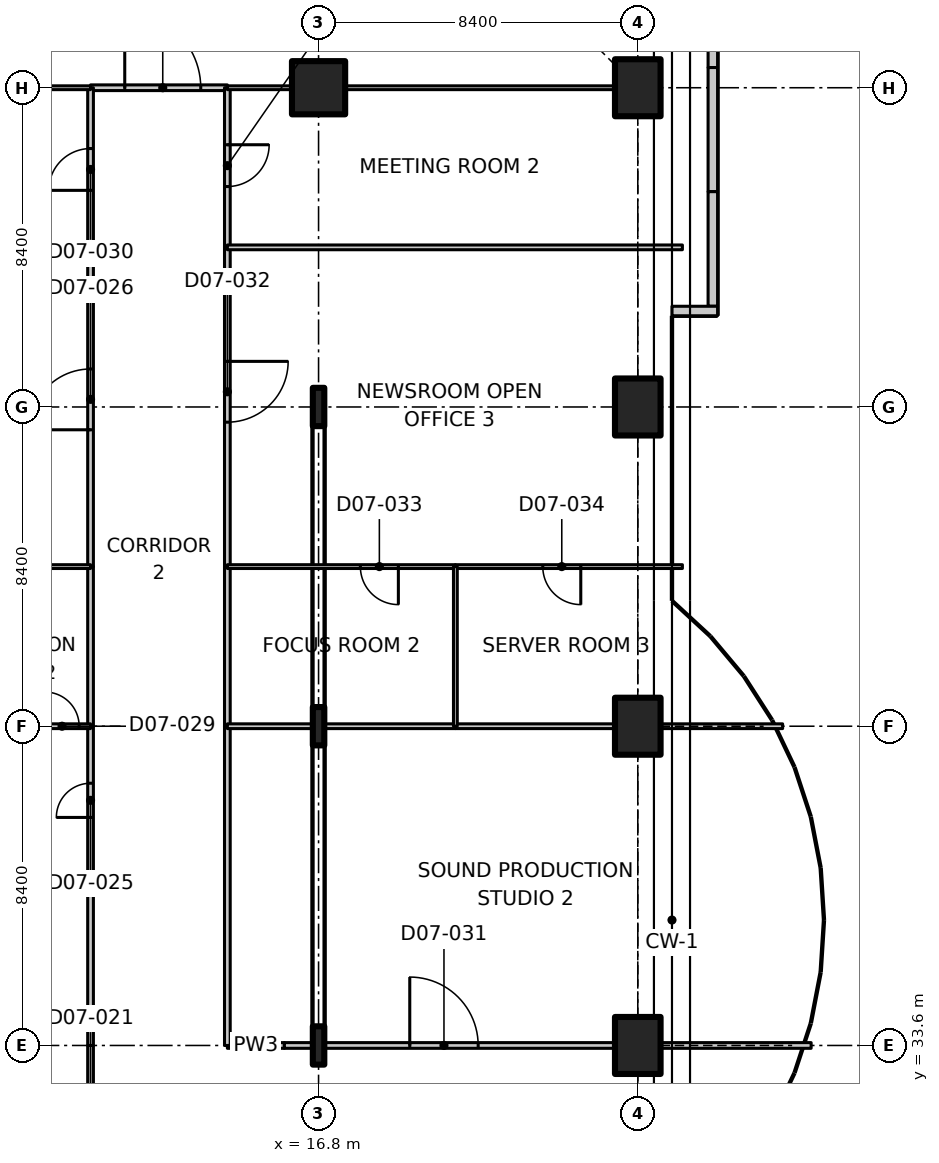
"""IFC4 building model, lengths in metres.
Left out: names, types, materials, properties, quantities, classifications, styles, units other than length and angle.
Written with IfcOpenShell. Run it as: python <this file> out.ifc"""

import sys

from ifc_helpers import new_model, si_unit, direction, frame, frame_2d, origin, origin_2d, place, context, subcontext, project, spatial, polyline, rectangle, i_section, outline, extrude, element, fill, save


model = new_model("IFC4")
c1 = context("Model", 3, precision=1e-05, world=origin(), true_north=direction((0.0, 1.0)))
c2 = subcontext(c1, "Body", "Model", "MODEL_VIEW")
j1 = project(units=[si_unit("LENGTHUNIT", "METRE"), si_unit("PLANEANGLEUNIT", "RADIAN")], contexts=[c1])
p1 = place(None, origin())
s1 = spatial("IfcSite", under=j1, at=p1, CompositionType="ELEMENT")
p2 = place(p1, origin())
s2 = spatial("IfcBuilding", under=s1, at=p2, CompositionType="ELEMENT")
p3 = place(p2, frame((0.0, 0.0, 36.5)))
s3 = spatial("IfcBuildingStorey", under=s2, at=p3, CompositionType="ELEMENT", Elevation=36.5)
p4 = place(p3, frame((16.8, 58.8, 0.0), z_axis=(0.0, 0.0, 1.0), x_axis=(1.0, 0.0, 0.0)))
e1 = element("IfcColumn", 1, at=p4, inside=s3, PredefinedType="COLUMN", context=c2, shape_type="SweptSolid", body=[
    extrude(rectangle(XDim=1.4, YDim=1.4, at=origin_2d()), origin(), (0.0, 0.0, 1.0), 3.35),
])
for number, where, z_axis, x_axis in (
    (2, (25.2, 33.6, 0.0), (0.0, 0.0, 1.0), (1.0, 0.0, 0.0)),
    (3, (25.2, 42.0, 0.0), (0.0, 0.0, 1.0), (1.0, 0.0, 0.0)),
    (4, (25.2, 50.4, 0.0), (0.0, 0.0, 1.0), (1.0, 0.0, 0.0)),
    (5, (25.2, 58.8, 0.0), (0.0, 0.0, 1.0), (1.0, 0.0, 0.0)),
):
    element("IfcColumn", number, at=place(p3, frame(where, z_axis=z_axis, x_axis=x_axis)), inside=s3, PredefinedType="COLUMN", context=c2, shape_type="SweptSolid", body=[
        extrude(rectangle(XDim=1.2, YDim=1.5, at=origin_2d()), origin(), (0.0, 0.0, 1.0), 3.35),
    ])
for number, where, z_axis, x_axis in (
    (6, (16.8, 33.6, -0.25), (0.0, 0.0, 1.0), (1.0, 0.0, 0.0)),
    (7, (16.8, 50.4, -0.25), (0.0, 0.0, 1.0), (1.0, 0.0, 0.0)),
    (8, (16.8, 42.0, -0.25), (0.0, 0.0, 1.0), (1.0, 0.0, 0.0)),
):
    element("IfcColumn", number, at=place(p3, frame(where, z_axis=z_axis, x_axis=x_axis)), inside=s3, PredefinedType="COLUMN", context=c2, shape_type="SweptSolid", body=[
        extrude(i_section(OverallWidth=0.302, OverallDepth=1.008, WebThickness=0.021, FlangeThickness=0.04, FilletRadius=0.03, at=origin_2d()), origin(), (0.0, 0.0, 1.0), 3.725),
    ])
p5 = place(p3, frame((27.175, 62.427, 0.0), z_axis=(0.0, 0.0, 1.0), x_axis=(0.0, -1.0, 0.0)))
e9 = element("IfcWall", 9, at=p5, inside=s3, PredefinedType="PARAPET", context=c2, shape_type="SweptSolid", body=[
    extrude(rectangle(XDim=3.096, YDim=0.25, at=frame_2d((1.548, 0.0))), origin(), (0.0, 0.0, 1.0), 1.1),
])
p6 = place(p3, frame((27.175, 59.331, 0.0), z_axis=(0.0, 0.0, 1.0), x_axis=(0.0, -1.0, 0.0)))
e10 = element("IfcWall", 10, at=p6, inside=s3, PredefinedType="PARAPET", context=c2, shape_type="SweptSolid", body=[
    extrude(rectangle(XDim=3.266, YDim=0.25, at=frame_2d((1.633, 0.0))), origin(), (0.0, 0.0, 1.0), 1.1),
])
p7 = place(p3, frame((27.175, 56.066, 0.0), z_axis=(0.0, 0.0, 1.0), x_axis=(0.0, -1.0, 0.0)))
e11 = element("IfcWall", 11, at=p7, inside=s3, PredefinedType="PARAPET", context=c2, shape_type="SweptSolid", body=[
    extrude(rectangle(XDim=3.016, YDim=0.25, at=frame_2d((1.508, 0.0))), origin(), (0.0, 0.0, 1.0), 1.1),
])
p8 = place(p3, frame((27.3, 52.925, 0.0), z_axis=(0.0, 0.0, 1.0), x_axis=(-1.0, 0.0, 0.0)))
e12 = element("IfcWall", 12, at=p8, inside=s3, PredefinedType="PARAPET", context=c2, shape_type="SweptSolid", body=[
    extrude(rectangle(XDim=1.2, YDim=0.25, at=frame_2d((0.6, 0.0))), origin(), (0.0, 0.0, 1.0), 1.1),
])
p9 = place(p3, frame((10.8, 29.4, 0.0), z_axis=(0.0, 0.0, 1.0), x_axis=(0.0, 1.0, 0.0)))
e13 = element("IfcWall", 13, at=p9, inside=s3, PredefinedType="PARTITIONING", context=c2, shape_type="SweptSolid", body=[
    extrude(rectangle(XDim=4.2, YDim=0.15, at=frame_2d((2.1, 0.0))), origin(), (0.0, 0.0, 1.0), 3.33),
])
p10 = place(p9, frame((1.2, 0.0, 0.0)))
e14 = element("IfcOpeningElement", 14, at=p10, cuts=e13, PredefinedType="OPENING", context=c2, shape_type="SweptSolid", body=[
    extrude(rectangle(XDim=1.6, YDim=2.1, at=frame_2d((0.8, 1.05))), frame((0.0, 0.085, 0.0), z_axis=(0.0, -1.0, 0.0), x_axis=(1.0, 0.0, 0.0)), (0.0, 0.0, 1.0), 0.17),
])
p11 = place(p3, frame((14.4, 33.6, 0.0), z_axis=(0.0, 0.0, 1.0), x_axis=(1.0, 0.0, 0.0)))
e15 = element("IfcWall", 15, at=p11, inside=s3, PredefinedType="PARTITIONING", context=c2, shape_type="SweptSolid", body=[
    extrude(rectangle(XDim=1.5, YDim=0.15, at=frame_2d((0.75, 0.0))), origin(), (0.0, 0.0, 1.0), 3.33),
])
p12 = place(p3, frame((15.9, 33.6, 0.0), z_axis=(0.0, 0.0, 1.0), x_axis=(1.0, 0.0, 0.0)))
e16 = element("IfcWall", 16, at=p12, inside=s3, PredefinedType="PARTITIONING", context=c2, shape_type="SweptSolid", body=[
    extrude(rectangle(XDim=8.68, YDim=0.15, at=frame_2d((4.34, 0.0))), origin(), (0.0, 0.0, 1.0), 3.33),
])
p13 = place(p12, frame((3.3, 0.0, 0.0)))
e17 = element("IfcOpeningElement", 17, at=p13, cuts=e16, PredefinedType="OPENING", context=c2, shape_type="SweptSolid", body=[
    extrude(rectangle(XDim=1.8, YDim=2.1, at=frame_2d((0.9, 1.05))), frame((0.0, 0.085, 0.0), z_axis=(0.0, -1.0, 0.0), x_axis=(1.0, 0.0, 0.0)), (0.0, 0.0, 1.0), 0.17),
])
p14 = place(p3, frame((25.82, 33.6, 0.0), z_axis=(0.0, 0.0, 1.0), x_axis=(1.0, 0.0, 0.0)))
e18 = element("IfcWall", 18, at=p14, inside=s3, PredefinedType="PARTITIONING", context=c2, shape_type="SweptSolid", body=[
    extrude(rectangle(XDim=3.942, YDim=0.15, at=frame_2d((1.971, 0.0))), origin(), (0.0, 0.0, 1.0), 2.98),
])
p15 = place(p3, frame((10.8, 58.8, 0.0), z_axis=(0.0, 0.0, 1.0), x_axis=(1.0, 0.0, 0.0)))
e19 = element("IfcWall", 19, at=p15, inside=s3, PredefinedType="PARTITIONING", context=c2, shape_type="SweptSolid", body=[
    extrude(rectangle(XDim=3.6, YDim=0.15, at=frame_2d((1.8, 0.0))), origin(), (0.0, 0.0, 1.0), 3.33),
])
p16 = place(p15, frame((0.9, 0.0, 0.0)))
e20 = element("IfcOpeningElement", 20, at=p16, cuts=e19, PredefinedType="OPENING", context=c2, shape_type="SweptSolid", body=[
    extrude(rectangle(XDim=2.0, YDim=2.4, at=frame_2d((1.0, 1.2))), frame((0.0, 0.085, 0.0), z_axis=(0.0, -1.0, 0.0), x_axis=(1.0, 0.0, 0.0)), (0.0, 0.0, 1.0), 0.17),
])
p17 = place(p3, frame((10.8, 33.6, 0.0), z_axis=(0.0, 0.0, 1.0), x_axis=(0.0, 1.0, 0.0)))
e21 = element("IfcWall", 21, at=p17, inside=s3, PredefinedType="PARTITIONING", context=c2, shape_type="SweptSolid", body=[
    extrude(rectangle(XDim=4.2, YDim=0.15, at=frame_2d((2.1, 0.0))), origin(), (0.0, 0.0, 1.0), 3.33),
])
p18 = place(p3, frame((10.8, 37.8, 0.0), z_axis=(0.0, 0.0, 1.0), x_axis=(0.0, 1.0, 0.0)))
e22 = element("IfcWall", 22, at=p18, inside=s3, PredefinedType="PARTITIONING", context=c2, shape_type="SweptSolid", body=[
    extrude(rectangle(XDim=4.2, YDim=0.15, at=frame_2d((2.1, 0.0))), origin(), (0.0, 0.0, 1.0), 3.33),
])
p19 = place(p18, frame((1.8, 0.0, 0.0)))
e23 = element("IfcOpeningElement", 23, at=p19, cuts=e22, PredefinedType="OPENING", context=c2, shape_type="SweptSolid", body=[
    extrude(rectangle(XDim=0.9, YDim=2.1, at=frame_2d((0.45, 1.05))), frame((0.0, 0.085, 0.0), z_axis=(0.0, -1.0, 0.0), x_axis=(1.0, 0.0, 0.0)), (0.0, 0.0, 1.0), 0.17),
])
p20 = place(p3, frame((10.8, 46.2, 0.0), z_axis=(0.0, 0.0, 1.0), x_axis=(0.0, 1.0, 0.0)))
e24 = element("IfcWall", 24, at=p20, inside=s3, PredefinedType="PARTITIONING", context=c2, shape_type="SweptSolid", body=[
    extrude(rectangle(XDim=8.4, YDim=0.15, at=frame_2d((4.2, 0.0))), origin(), (0.0, 0.0, 1.0), 3.33),
])
p21 = place(p20, frame((3.6, 0.0, 0.0)))
e25 = element("IfcOpeningElement", 25, at=p21, cuts=e24, PredefinedType="OPENING", context=c2, shape_type="SweptSolid", body=[
    extrude(rectangle(XDim=1.6, YDim=2.1, at=frame_2d((0.8, 1.05))), frame((0.0, 0.085, 0.0), z_axis=(0.0, -1.0, 0.0), x_axis=(1.0, 0.0, 0.0)), (0.0, 0.0, 1.0), 0.17),
])
p22 = place(p3, frame((10.8, 42.0, 0.0), z_axis=(0.0, 0.0, 1.0), x_axis=(0.0, 1.0, 0.0)))
e26 = element("IfcWall", 26, at=p22, inside=s3, PredefinedType="PARTITIONING", context=c2, shape_type="SweptSolid", body=[
    extrude(rectangle(XDim=4.2, YDim=0.15, at=frame_2d((2.1, 0.0))), origin(), (0.0, 0.0, 1.0), 3.33),
])
p23 = place(p3, frame((10.8, 54.6, 0.0), z_axis=(0.0, 0.0, 1.0), x_axis=(0.0, 1.0, 0.0)))
e27 = element("IfcWall", 27, at=p23, inside=s3, PredefinedType="PARTITIONING", context=c2, shape_type="SweptSolid", body=[
    extrude(rectangle(XDim=4.2, YDim=0.15, at=frame_2d((2.1, 0.0))), origin(), (0.0, 0.0, 1.0), 3.33),
])
p24 = place(p23, frame((1.5, 0.0, 0.0)))
e28 = element("IfcOpeningElement", 28, at=p24, cuts=e27, PredefinedType="OPENING", context=c2, shape_type="SweptSolid", body=[
    extrude(rectangle(XDim=1.1, YDim=2.1, at=frame_2d((0.55, 1.05))), frame((0.0, 0.085, 0.0), z_axis=(0.0, -1.0, 0.0), x_axis=(1.0, 0.0, 0.0)), (0.0, 0.0, 1.0), 0.17),
])
p25 = place(p3, frame((14.4, 42.0, 0.0), z_axis=(0.0, 0.0, 1.0), x_axis=(0.0, -1.0, 0.0)))
e29 = element("IfcWall", 29, at=p25, inside=s3, PredefinedType="PARTITIONING", context=c2, shape_type="SweptSolid", body=[
    extrude(rectangle(XDim=8.4, YDim=0.15, at=frame_2d((4.2, 0.0))), origin(), (0.0, 0.0, 1.0), 3.33),
])
p26 = place(p3, frame((14.4, 54.6, 0.0), z_axis=(0.0, 0.0, 1.0), x_axis=(0.0, -1.0, 0.0)))
e30 = element("IfcWall", 30, at=p26, inside=s3, PredefinedType="PARTITIONING", context=c2, shape_type="SweptSolid", body=[
    extrude(rectangle(XDim=8.4, YDim=0.15, at=frame_2d((4.2, 0.0))), origin(), (0.0, 0.0, 1.0), 3.33),
])
p27 = place(p26, frame((3.0, 0.0, 0.0)))
e31 = element("IfcOpeningElement", 31, at=p27, cuts=e30, PredefinedType="OPENING", context=c2, shape_type="SweptSolid", body=[
    extrude(rectangle(XDim=1.6, YDim=2.1, at=frame_2d((0.8, 1.05))), frame((0.0, 0.085, 0.0), z_axis=(0.0, -1.0, 0.0), x_axis=(1.0, 0.0, 0.0)), (0.0, 0.0, 1.0), 0.17),
])
p28 = place(p3, frame((14.4, 46.2, 0.0), z_axis=(0.0, 0.0, 1.0), x_axis=(0.0, -1.0, 0.0)))
e32 = element("IfcWall", 32, at=p28, inside=s3, PredefinedType="PARTITIONING", context=c2, shape_type="SweptSolid", body=[
    extrude(rectangle(XDim=4.2, YDim=0.15, at=frame_2d((2.1, 0.0))), origin(), (0.0, 0.0, 1.0), 3.33),
])
p29 = place(p3, frame((14.4, 58.8, 0.0), z_axis=(0.0, 0.0, 1.0), x_axis=(0.0, -1.0, 0.0)))
e33 = element("IfcWall", 33, at=p29, inside=s3, PredefinedType="PARTITIONING", context=c2, shape_type="SweptSolid", body=[
    extrude(rectangle(XDim=4.2, YDim=0.15, at=frame_2d((2.1, 0.0))), origin(), (0.0, 0.0, 1.0), 3.33),
])
p30 = place(p29, frame((1.5, 0.0, 0.0)))
e34 = element("IfcOpeningElement", 34, at=p30, cuts=e33, PredefinedType="OPENING", context=c2, shape_type="SweptSolid", body=[
    extrude(rectangle(XDim=1.1, YDim=2.1, at=frame_2d((0.55, 1.05))), frame((0.0, 0.085, 0.0), z_axis=(0.0, -1.0, 0.0), x_axis=(1.0, 0.0, 0.0)), (0.0, 0.0, 1.0), 0.17),
])
p31 = place(p3, frame((10.8, 58.8, 0.0), z_axis=(0.0, 0.0, 1.0), x_axis=(-1.0, 0.0, 0.0)))
e35 = element("IfcWall", 35, at=p31, inside=s3, PredefinedType="PARTITIONING", context=c2, shape_type="SweptSolid", body=[
    extrude(rectangle(XDim=1.68, YDim=0.1, at=frame_2d((0.84, 0.0))), origin(), (0.0, 0.0, 1.0), 3.33),
])
p32 = place(p3, frame((24.58, 58.8, 0.0), z_axis=(0.0, 0.0, 1.0), x_axis=(-1.0, 0.0, 0.0)))
e36 = element("IfcWall", 36, at=p32, inside=s3, PredefinedType="PARTITIONING", context=c2, shape_type="SweptSolid", body=[
    extrude(rectangle(XDim=7.06, YDim=0.1, at=frame_2d((3.53, 0.0))), origin(), (0.0, 0.0, 1.0), 3.33),
])
p33 = place(p3, frame((16.08, 58.8, 0.0), z_axis=(0.0, 0.0, 1.0), x_axis=(-1.0, 0.0, 0.0)))
e37 = element("IfcWall", 37, at=p33, inside=s3, PredefinedType="PARTITIONING", context=c2, shape_type="SweptSolid", body=[
    extrude(rectangle(XDim=1.68, YDim=0.1, at=frame_2d((0.84, 0.0))), origin(), (0.0, 0.0, 1.0), 3.33),
])
p34 = place(p3, frame((-1.47, 37.8, 0.0), z_axis=(0.0, 0.0, 1.0), x_axis=(1.0, 0.0, 0.0)))
e38 = element("IfcWall", 38, at=p34, inside=s3, PredefinedType="PARTITIONING", context=c2, shape_type="SweptSolid", body=[
    extrude(outline(polyline([(0.0, 0.0), (12.27, 0.0), (12.27, 3.33), (1.92, 3.33), (1.918, 2.98), (1.022, 2.98), (1.02, 3.33), (0.37, 3.33), (0.0, 3.33), (0.0, 0.0)])), frame((0.0, 0.062, 0.0), z_axis=(0.0, -1.0, 0.0), x_axis=(1.0, 0.0, 0.0)), (0.0, 0.0, 1.0), 0.125),
])
p35 = place(p3, frame((6.6, 42.0, 0.0), z_axis=(0.0, 0.0, 1.0), x_axis=(1.0, 0.0, 0.0)))
e39 = element("IfcWall", 39, at=p35, inside=s3, PredefinedType="PARTITIONING", context=c2, shape_type="SweptSolid", body=[
    extrude(rectangle(XDim=4.2, YDim=0.125, at=frame_2d((2.1, 0.0))), origin(), (0.0, 0.0, 1.0), 3.33),
])
p36 = place(p35, frame((3.0, 0.0, 0.0)))
e40 = element("IfcOpeningElement", 40, at=p36, cuts=e39, PredefinedType="OPENING", context=c2, shape_type="SweptSolid", body=[
    extrude(rectangle(XDim=0.9, YDim=2.1, at=frame_2d((0.45, 1.05))), frame((0.0, 0.073, 0.0), z_axis=(0.0, -1.0, 0.0), x_axis=(1.0, 0.0, 0.0)), (0.0, 0.0, 1.0), 0.145),
])
p37 = place(p3, frame((10.8, 46.2, 0.0), z_axis=(0.0, 0.0, 1.0), x_axis=(-1.0, 0.0, 0.0)))
e41 = element("IfcWall", 41, at=p37, inside=s3, PredefinedType="PARTITIONING", context=c2, shape_type="SweptSolid", body=[
    extrude(rectangle(XDim=4.2, YDim=0.1, at=frame_2d((2.1, 0.0))), origin(), (0.0, 0.0, 1.0), 3.33),
])
p38 = place(p3, frame((-1.174, 54.6, 0.0), z_axis=(0.0, 0.0, 1.0), x_axis=(1.0, 0.0, 0.0)))
e42 = element("IfcWall", 42, at=p38, inside=s3, PredefinedType="PARTITIONING", context=c2, shape_type="SweptSolid", body=[
    extrude(outline(polyline([(0.0, 0.0), (11.974, 0.0), (11.974, 3.33), (1.624, 3.33), (1.622, 2.98), (0.726, 2.98), (0.724, 3.33), (0.074, 3.33), (0.0, 3.33), (0.0, 0.0)])), frame((0.0, 0.062, 0.0), z_axis=(0.0, -1.0, 0.0), x_axis=(1.0, 0.0, 0.0)), (0.0, 0.0, 1.0), 0.125),
])
p39 = place(p3, frame((14.4, 42.0, 0.0), z_axis=(0.0, 0.0, 1.0), x_axis=(1.0, 0.0, 0.0)))
e43 = element("IfcWall", 43, at=p39, inside=s3, PredefinedType="PARTITIONING", context=c2, shape_type="SweptSolid", body=[
    extrude(rectangle(XDim=6.0, YDim=0.125, at=frame_2d((3.0, 0.0))), origin(), (0.0, 0.0, 1.0), 3.33),
])
p40 = place(p3, frame((20.4, 42.0, 0.0), z_axis=(0.0, 0.0, 1.0), x_axis=(1.0, 0.0, 0.0)))
e44 = element("IfcWall", 44, at=p40, inside=s3, PredefinedType="PARTITIONING", context=c2, shape_type="SweptSolid", body=[
    extrude(rectangle(XDim=4.18, YDim=0.125, at=frame_2d((2.09, 0.0))), origin(), (0.0, 0.0, 1.0), 3.33),
])
p41 = place(p3, frame((25.82, 42.0, 0.0), z_axis=(0.0, 0.0, 1.0), x_axis=(1.0, 0.0, 0.0)))
e45 = element("IfcWall", 45, at=p41, inside=s3, PredefinedType="PARTITIONING", context=c2, shape_type="SweptSolid", body=[
    extrude(rectangle(XDim=3.191, YDim=0.125, at=frame_2d((1.596, 0.0))), origin(), (0.0, 0.0, 1.0), 2.98),
])
p42 = place(p3, frame((20.4, 46.2, 0.0), z_axis=(0.0, 0.0, 1.0), x_axis=(-1.0, 0.0, 0.0)))
e46 = element("IfcWall", 46, at=p42, inside=s3, PredefinedType="PARTITIONING", context=c2, shape_type="SweptSolid", body=[
    extrude(rectangle(XDim=6.0, YDim=0.1, at=frame_2d((3.0, 0.0))), origin(), (0.0, 0.0, 1.0), 3.33),
])
p43 = place(p42, frame((1.5, 0.0, 0.0)))
e47 = element("IfcOpeningElement", 47, at=p43, cuts=e46, PredefinedType="OPENING", context=c2, shape_type="SweptSolid", body=[
    extrude(rectangle(XDim=1.0, YDim=2.1, at=frame_2d((0.5, 1.05))), frame((0.0, 0.06, 0.0), z_axis=(0.0, -1.0, 0.0), x_axis=(1.0, 0.0, 0.0)), (0.0, 0.0, 1.0), 0.12),
])
p44 = place(p3, frame((26.374, 46.2, 0.0), z_axis=(0.0, 0.0, 1.0), x_axis=(-1.0, 0.0, 0.0)))
e48 = element("IfcWall", 48, at=p44, inside=s3, PredefinedType="PARTITIONING", context=c2, shape_type="SweptSolid", body=[
    extrude(outline(polyline([(0.0, 0.0), (5.974, 0.0), (5.974, 3.33), (1.624, 3.33), (1.622, 2.98), (0.726, 2.98), (0.724, 3.33), (0.074, 3.33), (0.0, 3.33), (0.0, 0.0)])), frame((0.0, 0.05, 0.0), z_axis=(0.0, -1.0, 0.0), x_axis=(1.0, 0.0, 0.0)), (0.0, 0.0, 1.0), 0.1),
])
p45 = place(p44, frame((2.674, 0.0, 0.0)))
e49 = element("IfcOpeningElement", 49, at=p45, cuts=e48, PredefinedType="OPENING", context=c2, shape_type="SweptSolid", body=[
    extrude(rectangle(XDim=1.0, YDim=2.1, at=frame_2d((0.5, 1.05))), frame((0.0, 0.06, 0.0), z_axis=(0.0, -1.0, 0.0), x_axis=(1.0, 0.0, 0.0)), (0.0, 0.0, 1.0), 0.12),
])
p46 = place(p3, frame((14.4, 54.6, 0.0), z_axis=(0.0, 0.0, 1.0), x_axis=(1.0, 0.0, 0.0)))
e50 = element("IfcWall", 50, at=p46, inside=s3, PredefinedType="PARTITIONING", context=c2, shape_type="SweptSolid", body=[
    extrude(outline(polyline([(0.0, 0.0), (11.974, 0.0), (11.974, 3.33), (11.9, 3.33), (11.25, 3.33), (11.248, 2.98), (10.352, 2.98), (10.35, 3.33), (0.0, 3.33), (0.0, 0.0)])), frame((0.0, 0.062, 0.0), z_axis=(0.0, -1.0, 0.0), x_axis=(1.0, 0.0, 0.0)), (0.0, 0.0, 1.0), 0.125),
])
p47 = place(p3, frame((20.4, 46.2, 0.0), z_axis=(0.0, 0.0, 1.0), x_axis=(0.0, -1.0, 0.0)))
e51 = element("IfcWall", 51, at=p47, inside=s3, PredefinedType="PARTITIONING", context=c2, shape_type="SweptSolid", body=[
    extrude(rectangle(XDim=4.2, YDim=0.1, at=frame_2d((2.1, 0.0))), origin(), (0.0, 0.0, 1.0), 3.33),
])
p48 = place(p16, origin())
e52 = element("IfcDoor", 52, at=p48, inside=s3, OperationType="DOUBLE_DOOR_SINGLE_SWING", PredefinedType="DOOR", context=c2, shape_type="SweptSolid", body=[
    extrude(rectangle(XDim=2.0, YDim=2.4, at=frame_2d((1.0, 1.2))), frame((0.0, 0.025, 0.0), z_axis=(0.0, -1.0, 0.0), x_axis=(1.0, 0.0, 0.0)), (0.0, 0.0, 1.0), 0.05),
])
fill(e20, e52)
p49 = place(p19, origin())
e53 = element("IfcDoor", 53, at=p49, inside=s3, OperationType="SINGLE_SWING_LEFT", PredefinedType="DOOR", context=c2, shape_type="SweptSolid", body=[
    extrude(rectangle(XDim=0.9, YDim=2.1, at=frame_2d((0.45, 1.05))), frame((0.0, 0.025, 0.0), z_axis=(0.0, -1.0, 0.0), x_axis=(1.0, 0.0, 0.0)), (0.0, 0.0, 1.0), 0.05),
])
fill(e23, e53)
p50 = place(p21, origin())
e54 = element("IfcDoor", 54, at=p50, inside=s3, OperationType="DOUBLE_DOOR_SINGLE_SWING", PredefinedType="DOOR", context=c2, shape_type="SweptSolid", body=[
    extrude(rectangle(XDim=1.6, YDim=2.1, at=frame_2d((0.8, 1.05))), frame((0.0, 0.025, 0.0), z_axis=(0.0, -1.0, 0.0), x_axis=(1.0, 0.0, 0.0)), (0.0, 0.0, 1.0), 0.05),
])
fill(e25, e54)
p51 = place(p36, origin())
e55 = element("IfcDoor", 55, at=p51, inside=s3, OperationType="SINGLE_SWING_RIGHT", PredefinedType="DOOR", context=c2, shape_type="SweptSolid", body=[
    extrude(rectangle(XDim=0.9, YDim=2.1, at=frame_2d((0.45, 1.05))), frame((0.0, 0.025, 0.0), z_axis=(0.0, -1.0, 0.0), x_axis=(1.0, 0.0, 0.0)), (0.0, 0.0, 1.0), 0.05),
])
fill(e40, e55)
p52 = place(p24, origin())
e56 = element("IfcDoor", 56, at=p52, inside=s3, OperationType="SINGLE_SWING_LEFT", PredefinedType="DOOR", context=c2, shape_type="SweptSolid", body=[
    extrude(rectangle(XDim=1.1, YDim=2.1, at=frame_2d((0.55, 1.05))), frame((0.0, 0.025, 0.0), z_axis=(0.0, -1.0, 0.0), x_axis=(1.0, 0.0, 0.0)), (0.0, 0.0, 1.0), 0.05),
])
fill(e28, e56)
p53 = place(p13, origin())
e57 = element("IfcDoor", 57, at=p53, inside=s3, OperationType="DOUBLE_DOOR_SINGLE_SWING", PredefinedType="DOOR", context=c2, shape_type="SweptSolid", body=[
    extrude(rectangle(XDim=1.8, YDim=2.1, at=frame_2d((0.9, 1.05))), frame((0.0, 0.025, 0.0), z_axis=(0.0, -1.0, 0.0), x_axis=(1.0, 0.0, 0.0)), (0.0, 0.0, 1.0), 0.05),
])
fill(e17, e57)
p54 = place(p27, origin())
e58 = element("IfcDoor", 58, at=p54, inside=s3, OperationType="DOUBLE_DOOR_SINGLE_SWING", PredefinedType="DOOR", context=c2, shape_type="SweptSolid", body=[
    extrude(rectangle(XDim=1.6, YDim=2.1, at=frame_2d((0.8, 1.05))), frame((0.0, 0.025, 0.0), z_axis=(0.0, -1.0, 0.0), x_axis=(1.0, 0.0, 0.0)), (0.0, 0.0, 1.0), 0.05),
])
fill(e31, e58)
p55 = place(p43, origin())
e59 = element("IfcDoor", 59, at=p55, inside=s3, OperationType="SINGLE_SWING_LEFT", PredefinedType="DOOR", context=c2, shape_type="SweptSolid", body=[
    extrude(rectangle(XDim=1.0, YDim=2.1, at=frame_2d((0.5, 1.05))), frame((0.0, 0.025, 0.0), z_axis=(0.0, -1.0, 0.0), x_axis=(1.0, 0.0, 0.0)), (0.0, 0.0, 1.0), 0.05),
])
fill(e47, e59)
p56 = place(p45, origin())
e60 = element("IfcDoor", 60, at=p56, inside=s3, OperationType="SINGLE_SWING_LEFT", PredefinedType="DOOR", context=c2, shape_type="SweptSolid", body=[
    extrude(rectangle(XDim=1.0, YDim=2.1, at=frame_2d((0.5, 1.05))), frame((0.0, 0.025, 0.0), z_axis=(0.0, -1.0, 0.0), x_axis=(1.0, 0.0, 0.0)), (0.0, 0.0, 1.0), 0.05),
])
fill(e49, e60)
p57 = place(p30, origin())
e61 = element("IfcDoor", 61, at=p57, inside=s3, OperationType="SINGLE_SWING_LEFT", PredefinedType="DOOR", context=c2, shape_type="SweptSolid", body=[
    extrude(rectangle(XDim=1.1, YDim=2.1, at=frame_2d((0.55, 1.05))), frame((0.0, 0.025, 0.0), z_axis=(0.0, -1.0, 0.0), x_axis=(1.0, 0.0, 0.0)), (0.0, 0.0, 1.0), 0.05),
])
fill(e34, e61)
save(model, sys.argv[1])
